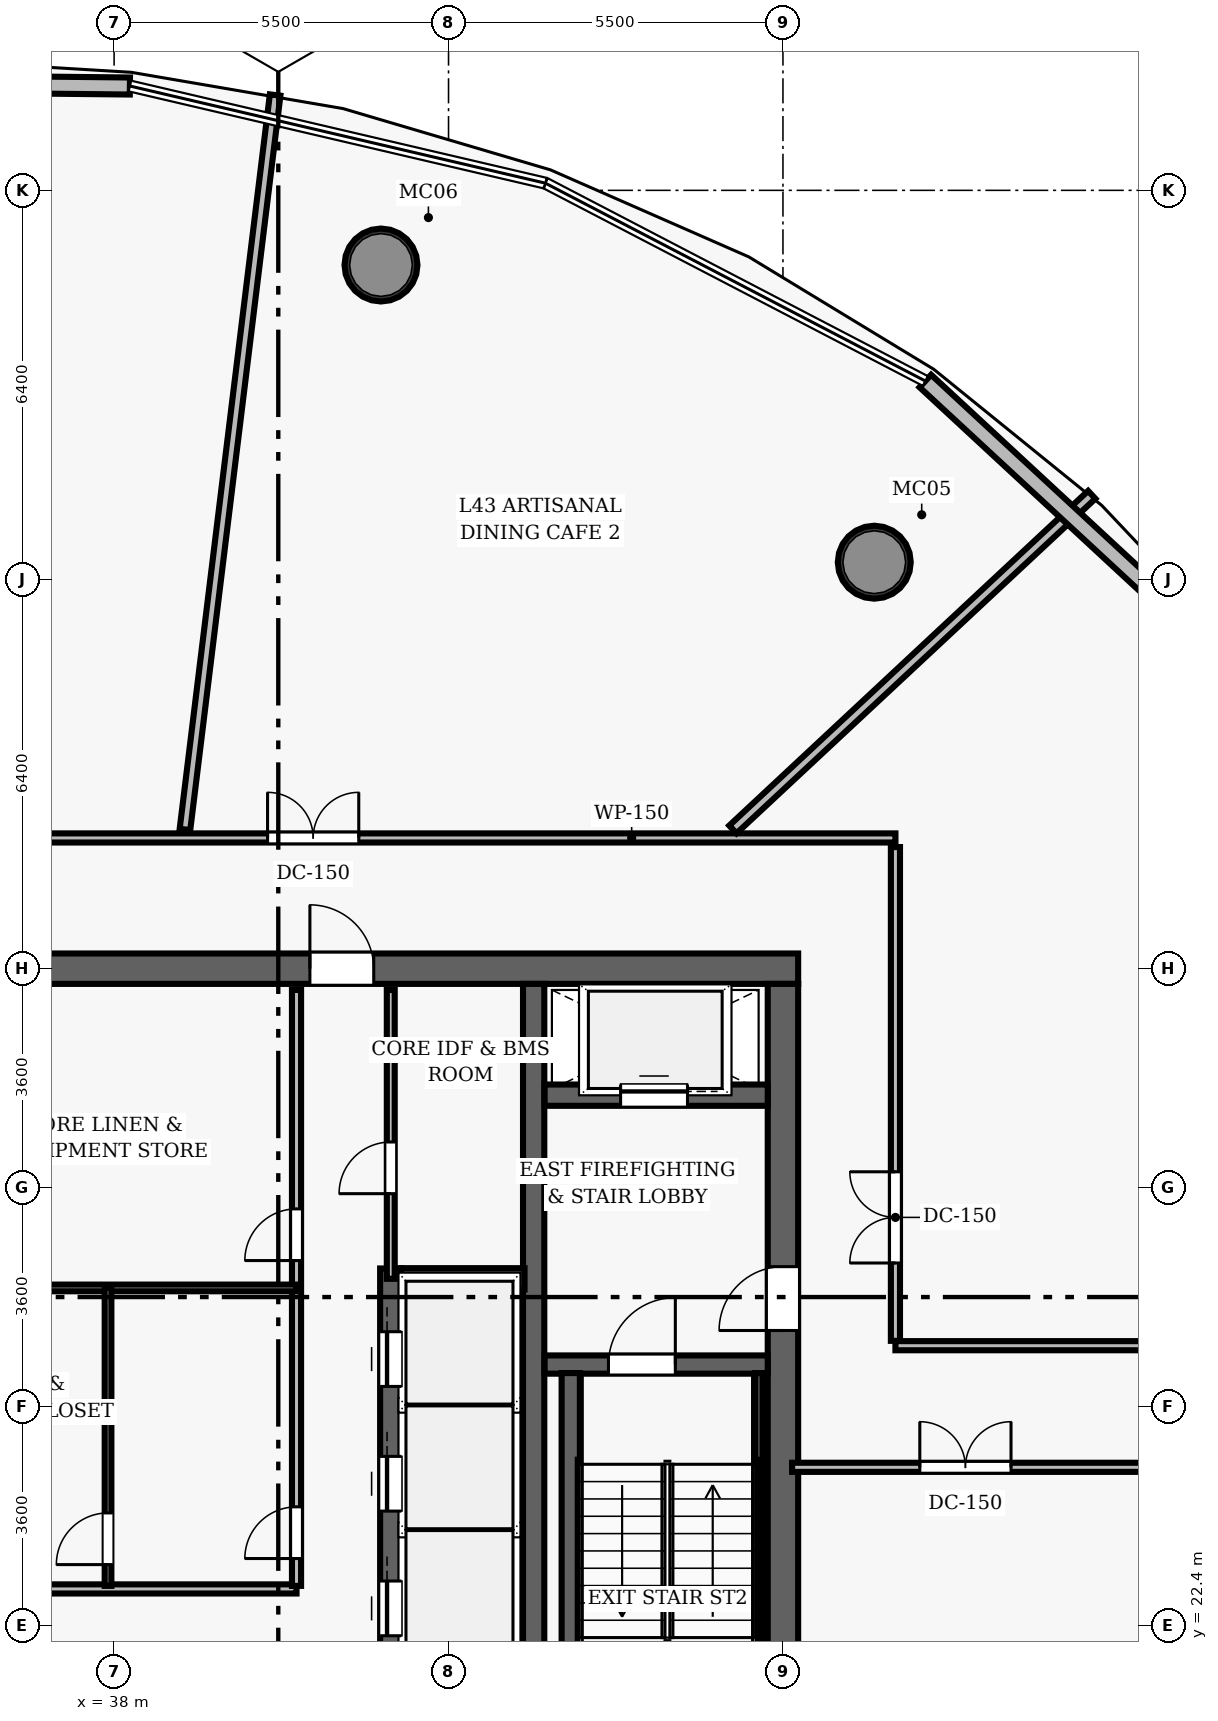
"""IFC4 building model, lengths in metres.
Left out: names, types, materials, properties, quantities, classifications, styles, units other than length and angle.
Written with IfcOpenShell. Run it as: python <this file> out.ifc"""

import sys

from ifc_helpers import new_model, si_unit, direction, frame, frame_2d, origin, origin_2d, place, context, subcontext, project, spatial, rectangle, hollow_circle, extrude, element, fill, save


model = new_model("IFC4")
c1 = context("Model", 3, precision=1e-05, world=origin(), true_north=direction((0.0, 1.0)))
c2 = subcontext(c1, "Body", "Model", "MODEL_VIEW")
j1 = project(units=[si_unit("LENGTHUNIT", "METRE"), si_unit("PLANEANGLEUNIT", "RADIAN")], contexts=[c1])
p1 = place(None, origin())
s1 = spatial("IfcSite", under=j1, at=p1, CompositionType="ELEMENT")
p2 = place(p1, origin())
s2 = spatial("IfcBuilding", under=s1, at=p2, CompositionType="ELEMENT")
p3 = place(p2, frame((0.0, 0.0, 171.2)))
s3 = spatial("IfcBuildingStorey", under=s2, at=p3, CompositionType="ELEMENT", Elevation=171.2)
p4 = place(p3, frame((26.75, 33.2, 0.0), z_axis=(0.0, 0.0, 1.0), x_axis=(1.0, 0.0, 0.0)))
e1 = element("IfcWall", 1, at=p4, inside=s3, PredefinedType="SHEAR", context=c2, shape_type="SweptSolid", body=[
    extrude(rectangle(XDim=22.5, YDim=0.5, at=frame_2d((11.25, 0.0))), origin(), (0.0, 0.0, 1.0), 3.85),
])
p5 = place(p4, frame((4.57, 0.0, 0.0)))
e2 = element("IfcOpeningElement", 2, at=p5, cuts=e1, PredefinedType="OPENING", context=c2, shape_type="SweptSolid", body=[
    extrude(rectangle(XDim=1.05, YDim=2.15, at=frame_2d((0.525, 1.075))), frame((0.0, 0.26, 0.0), z_axis=(0.0, -1.0, 0.0), x_axis=(1.0, 0.0, 0.0)), (0.0, 0.0, 1.0), 0.52),
])
p6 = place(p4, frame((14.47, 0.0, 0.0)))
e3 = element("IfcOpeningElement", 3, at=p6, cuts=e1, PredefinedType="OPENING", context=c2, shape_type="SweptSolid", body=[
    extrude(rectangle(XDim=1.05, YDim=2.15, at=frame_2d((0.525, 1.075))), frame((0.0, 0.26, 0.0), z_axis=(0.0, -1.0, 0.0), x_axis=(1.0, 0.0, 0.0)), (0.0, 0.0, 1.0), 0.52),
])
p7 = place(p3, frame((49.0, 19.05, 0.0), z_axis=(0.0, 0.0, 1.0), x_axis=(0.0, 1.0, 0.0)))
e4 = element("IfcWall", 4, at=p7, inside=s3, PredefinedType="SHEAR", context=c2, shape_type="SweptSolid", body=[
    extrude(rectangle(XDim=13.9, YDim=0.5, at=frame_2d((6.95, 0.0))), origin(), (0.0, 0.0, 1.0), 3.85),
])
p8 = place(p7, frame((8.2, 0.0, 0.0)))
e5 = element("IfcOpeningElement", 5, at=p8, cuts=e4, PredefinedType="OPENING", context=c2, shape_type="SweptSolid", body=[
    extrude(rectangle(XDim=1.05, YDim=2.15, at=frame_2d((0.525, 1.075))), frame((0.0, 0.26, 0.0), z_axis=(0.0, -1.0, 0.0), x_axis=(1.0, 0.0, 0.0)), (0.0, 0.0, 1.0), 0.52),
])
p9 = place(p3, frame((44.9, 19.05, 0.0), z_axis=(0.0, 0.0, 1.0), x_axis=(0.0, 1.0, 0.0)))
e6 = element("IfcWall", 6, at=p9, inside=s3, PredefinedType="SHEAR", context=c2, shape_type="SweptSolid", body=[
    extrude(rectangle(XDim=13.9, YDim=0.35, at=frame_2d((6.95, 0.0))), origin(), (0.0, 0.0, 1.0), 3.85),
])
for number, where, z_axis, x_axis in (
    (7, (50.502, 39.885, 0.0), (0.0, 0.0, 1.0), (1.0, 0.0, 0.0)),
    (8, (42.389, 44.772, 0.0), (0.0, 0.0, 1.0), (1.0, 0.0, 0.0)),
):
    element("IfcColumn", number, at=place(p3, frame(where, z_axis=z_axis, x_axis=x_axis)), inside=s3, PredefinedType="COLUMN", context=c2, shape_type="SweptSolid", body=[
        extrude(hollow_circle(Radius=0.6, WallThickness=0.05, at=origin_2d()), origin(), (0.0, 0.0, 1.0), 3.85),
    ])
p10 = place(p3, frame((45.08, 26.69, 0.0), z_axis=(0.0, 0.0, 1.0), x_axis=(1.0, 0.0, 0.0)))
e9 = element("IfcWall", 9, at=p10, inside=s3, PredefinedType="SHEAR", context=c2, shape_type="SweptSolid", body=[
    extrude(rectangle(XDim=3.67, YDim=0.3, at=frame_2d((1.835, 0.0))), origin(), (0.0, 0.0, 1.0), 3.85),
])
p11 = place(p10, frame((1.05, 0.0, 0.0)))
e10 = element("IfcOpeningElement", 10, at=p11, cuts=e9, PredefinedType="OPENING", context=c2, shape_type="SweptSolid", body=[
    extrude(rectangle(XDim=1.1, YDim=2.15, at=frame_2d((0.55, 1.075))), frame((0.0, 0.16, 0.0), z_axis=(0.0, -1.0, 0.0), x_axis=(1.0, 0.0, 0.0)), (0.0, 0.0, 1.0), 0.32),
])
p12 = place(p3, frame((45.51, 19.05, 0.0), z_axis=(0.0, 0.0, 1.0), x_axis=(0.0, 1.0, 0.0)))
e11 = element("IfcWall", 11, at=p12, inside=s3, PredefinedType="SHEAR", context=c2, shape_type="SweptSolid", body=[
    extrude(rectangle(XDim=7.5, YDim=0.3, at=frame_2d((3.75, 0.0))), origin(), (0.0, 0.0, 1.0), 3.85),
])
p13 = place(p3, frame((48.605, 19.1, 0.0), z_axis=(0.0, 0.0, 1.0), x_axis=(0.0, 1.0, 0.0)))
e12 = element("IfcWall", 12, at=p13, inside=s3, PredefinedType="SHEAR", context=c2, shape_type="SweptSolid", body=[
    extrude(rectangle(XDim=7.45, YDim=0.12, at=frame_2d((3.725, 0.0))), origin(), (0.0, 0.0, 1.0), 3.85),
])
p14 = place(p3, frame((45.08, 31.12, 0.0), z_axis=(0.0, 0.0, 1.0), x_axis=(1.0, 0.0, 0.0)))
e13 = element("IfcWall", 13, at=p14, inside=s3, PredefinedType="SHEAR", context=c2, shape_type="SweptSolid", body=[
    extrude(rectangle(XDim=3.67, YDim=0.35, at=frame_2d((1.835, 0.0))), origin(), (0.0, 0.0, 1.0), 3.035),
])
p15 = place(p14, frame((1.25, 0.0, 0.0)))
e14 = element("IfcOpeningElement", 14, at=p15, cuts=e13, PredefinedType="OPENING", context=c2, shape_type="SweptSolid", body=[
    extrude(rectangle(XDim=1.1, YDim=2.15, at=frame_2d((0.55, 1.075))), frame((0.0, 0.185, 0.0), z_axis=(0.0, -1.0, 0.0), x_axis=(1.0, 0.0, 0.0)), (0.0, 0.0, 1.0), 0.37),
])
p16 = place(p3, frame((42.55, 21.73, 0.0), z_axis=(0.0, 0.0, 1.0), x_axis=(0.0, 1.0, 0.0)))
e15 = element("IfcWall", 15, at=p16, inside=s3, PredefinedType="SHEAR", context=c2, shape_type="SweptSolid", body=[
    extrude(rectangle(XDim=6.54, YDim=0.35, at=frame_2d((3.27, 0.0))), origin(), (0.0, 0.0, 1.0), 3.035),
])
p17 = place(p16, frame((0.5, 0.0, 0.0)))
e16 = element("IfcOpeningElement", 16, at=p17, cuts=e15, PredefinedType="OPENING", context=c2, shape_type="SweptSolid", body=[
    extrude(rectangle(XDim=0.9, YDim=2.15, at=frame_2d((0.45, 1.075))), frame((0.0, 0.185, 0.0), z_axis=(0.0, -1.0, 0.0), x_axis=(1.0, 0.0, 0.0)), (0.0, 0.0, 1.0), 0.37),
])
p18 = place(p16, frame((2.55, 0.0, 0.0)))
e17 = element("IfcOpeningElement", 17, at=p18, cuts=e15, PredefinedType="OPENING", context=c2, shape_type="SweptSolid", body=[
    extrude(rectangle(XDim=0.9, YDim=2.15, at=frame_2d((0.45, 1.075))), frame((0.0, 0.185, 0.0), z_axis=(0.0, -1.0, 0.0), x_axis=(1.0, 0.0, 0.0)), (0.0, 0.0, 1.0), 0.37),
])
p19 = place(p16, frame((4.6, 0.0, 0.0)))
e18 = element("IfcOpeningElement", 18, at=p19, cuts=e15, PredefinedType="OPENING", context=c2, shape_type="SweptSolid", body=[
    extrude(rectangle(XDim=0.9, YDim=2.15, at=frame_2d((0.45, 1.075))), frame((0.0, 0.185, 0.0), z_axis=(0.0, -1.0, 0.0), x_axis=(1.0, 0.0, 0.0)), (0.0, 0.0, 1.0), 0.37),
])
p20 = place(p3, frame((42.72, 28.1, 0.0), z_axis=(0.0, 0.0, 1.0), x_axis=(1.0, 0.0, 0.0)))
e19 = element("IfcWall", 19, at=p20, inside=s3, PredefinedType="SHEAR", context=c2, shape_type="SweptSolid", body=[
    extrude(rectangle(XDim=2.03, YDim=0.35, at=frame_2d((1.015, 0.0))), origin(), (0.0, 0.0, 1.0), 3.035),
])
p21 = place(p3, frame((34.75, 23.0, 0.0), z_axis=(0.0, 0.0, 1.0), x_axis=(1.0, 0.0, 0.0)))
e20 = element("IfcWall", 20, at=p21, inside=s3, PredefinedType="PARTITIONING", context=c2, shape_type="SweptSolid", body=[
    extrude(rectangle(XDim=6.25, YDim=0.15, at=frame_2d((3.125, 0.0))), origin(), (0.0, 0.0, 1.0), 3.035),
])
p22 = place(p3, frame((41.0, 23.05, 0.0), z_axis=(0.0, 0.0, 1.0), x_axis=(0.0, 1.0, 0.0)))
e21 = element("IfcWall", 21, at=p22, inside=s3, PredefinedType="PARTITIONING", context=c2, shape_type="SweptSolid", body=[
    extrude(rectangle(XDim=9.8, YDim=0.15, at=frame_2d((4.9, 0.0))), origin(), (0.0, 0.0, 1.0), 3.035),
])
p23 = place(p22, frame((5.35, 0.0, 0.0)))
e22 = element("IfcOpeningElement", 22, at=p23, cuts=e21, PredefinedType="OPENING", context=c2, shape_type="SweptSolid", body=[
    extrude(rectangle(XDim=0.85, YDim=2.1, at=frame_2d((0.425, 1.05))), frame((0.0, 0.085, 0.0), z_axis=(0.0, -1.0, 0.0), x_axis=(1.0, 0.0, 0.0)), (0.0, 0.0, 1.0), 0.17),
])
p24 = place(p22, frame((0.45, 0.0, 0.0)))
e23 = element("IfcOpeningElement", 23, at=p24, cuts=e21, PredefinedType="OPENING", context=c2, shape_type="SweptSolid", body=[
    extrude(rectangle(XDim=0.85, YDim=2.1, at=frame_2d((0.425, 1.05))), frame((0.0, 0.085, 0.0), z_axis=(0.0, -1.0, 0.0), x_axis=(1.0, 0.0, 0.0)), (0.0, 0.0, 1.0), 0.17),
])
p25 = place(p3, frame((34.75, 27.95, 0.0), z_axis=(0.0, 0.0, 1.0), x_axis=(1.0, 0.0, 0.0)))
e24 = element("IfcWall", 24, at=p25, inside=s3, PredefinedType="PARTITIONING", context=c2, shape_type="SweptSolid", body=[
    extrude(rectangle(XDim=6.25, YDim=0.11, at=frame_2d((3.125, 0.0))), origin(), (0.0, 0.0, 1.0), 3.035),
])
p26 = place(p3, frame((37.9, 23.05, 0.0), z_axis=(0.0, 0.0, 1.0), x_axis=(0.0, 1.0, 0.0)))
e25 = element("IfcWall", 25, at=p26, inside=s3, PredefinedType="PARTITIONING", context=c2, shape_type="SweptSolid", body=[
    extrude(rectangle(XDim=4.9, YDim=0.11, at=frame_2d((2.45, 0.0))), origin(), (0.0, 0.0, 1.0), 3.035),
])
p27 = place(p26, frame((0.35, 0.0, 0.0)))
e26 = element("IfcOpeningElement", 26, at=p27, cuts=e25, PredefinedType="OPENING", context=c2, shape_type="SweptSolid", body=[
    extrude(rectangle(XDim=0.85, YDim=2.1, at=frame_2d((0.425, 1.05))), frame((0.0, 0.065, 0.0), z_axis=(0.0, -1.0, 0.0), x_axis=(1.0, 0.0, 0.0)), (0.0, 0.0, 1.0), 0.13),
])
p28 = place(p3, frame((42.55, 28.1, 0.0), z_axis=(0.0, 0.0, 1.0), x_axis=(0.0, 1.0, 0.0)))
e27 = element("IfcWall", 27, at=p28, inside=s3, PredefinedType="PARTITIONING", context=c2, shape_type="SweptSolid", body=[
    extrude(rectangle(XDim=4.75, YDim=0.13, at=frame_2d((2.375, 0.0))), origin(), (0.0, 0.0, 1.0), 3.035),
])
p29 = place(p28, frame((1.4, 0.0, 0.0)))
e28 = element("IfcOpeningElement", 28, at=p29, cuts=e27, PredefinedType="OPENING", context=c2, shape_type="SweptSolid", body=[
    extrude(rectangle(XDim=0.85, YDim=2.1, at=frame_2d((0.425, 1.05))), frame((0.0, 0.075, 0.0), z_axis=(0.0, -1.0, 0.0), x_axis=(1.0, 0.0, 0.0)), (0.0, 0.0, 1.0), 0.15),
])
p30 = place(p3, frame((24.85, 35.35, 0.0), z_axis=(0.0, 0.0, 1.0), x_axis=(1.0, 0.0, 0.0)))
e29 = element("IfcWall", 29, at=p30, inside=s3, PredefinedType="PARTITIONING", context=c2, shape_type="SweptSolid", body=[
    extrude(rectangle(XDim=26.0, YDim=0.15, at=frame_2d((13.0, 0.0))), origin(), (0.0, 0.0, 1.0), 3.035),
])
p31 = place(p30, frame((15.674, 0.0, 0.0)))
e30 = element("IfcOpeningElement", 30, at=p31, cuts=e29, PredefinedType="OPENING", context=c2, shape_type="SweptSolid", body=[
    extrude(rectangle(XDim=1.5, YDim=2.2, at=frame_2d((0.75, 1.1))), frame((0.0, 0.085, 0.0), z_axis=(0.0, -1.0, 0.0), x_axis=(1.0, 0.0, 0.0)), (0.0, 0.0, 1.0), 0.17),
])
p32 = place(p30, frame((10.178, 0.0, 0.0)))
e31 = element("IfcOpeningElement", 31, at=p32, cuts=e29, PredefinedType="OPENING", context=c2, shape_type="SweptSolid", body=[
    extrude(rectangle(XDim=0.95, YDim=2.15, at=frame_2d((0.475, 1.075))), frame((0.0, 0.085, 0.0), z_axis=(0.0, -1.0, 0.0), x_axis=(1.0, 0.0, 0.0)), (0.0, 0.0, 1.0), 0.17),
])
p33 = place(p30, frame((4.997, 0.0, 0.0)))
e32 = element("IfcOpeningElement", 32, at=p33, cuts=e29, PredefinedType="OPENING", context=c2, shape_type="SweptSolid", body=[
    extrude(rectangle(XDim=0.95, YDim=2.15, at=frame_2d((0.475, 1.075))), frame((0.0, 0.085, 0.0), z_axis=(0.0, -1.0, 0.0), x_axis=(1.0, 0.0, 0.0)), (0.0, 0.0, 1.0), 0.17),
])
p34 = place(p3, frame((50.85, 27.08, 0.0), z_axis=(0.0, 0.0, 1.0), x_axis=(0.0, 1.0, 0.0)))
e33 = element("IfcWall", 33, at=p34, inside=s3, PredefinedType="PARTITIONING", context=c2, shape_type="SweptSolid", body=[
    extrude(rectangle(XDim=8.12, YDim=0.15, at=frame_2d((4.06, 0.0))), origin(), (0.0, 0.0, 1.0), 3.035),
])
p35 = place(p34, frame((1.28, 0.0, 0.0)))
e34 = element("IfcOpeningElement", 34, at=p35, cuts=e33, PredefinedType="OPENING", context=c2, shape_type="SweptSolid", body=[
    extrude(rectangle(XDim=1.5, YDim=2.2, at=frame_2d((0.75, 1.1))), frame((0.0, 0.085, 0.0), z_axis=(0.0, -1.0, 0.0), x_axis=(1.0, 0.0, 0.0)), (0.0, 0.0, 1.0), 0.17),
])
p36 = place(p3, frame((50.85, 27.0, 0.0), z_axis=(0.0, 0.0, 1.0), x_axis=(1.0, 0.0, 0.0)))
e35 = element("IfcWall", 35, at=p36, inside=s3, PredefinedType="PARTITIONING", context=c2, shape_type="SweptSolid", body=[
    extrude(rectangle(XDim=9.703, YDim=0.15, at=frame_2d((4.852, 0.0))), origin(), (0.0, 0.0, 1.0), 3.035),
])
p37 = place(p3, frame((49.15, 25.0, 0.0), z_axis=(0.0, 0.0, 1.0), x_axis=(1.0, 0.0, 0.0)))
e36 = element("IfcWall", 36, at=p37, inside=s3, PredefinedType="PARTITIONING", context=c2, shape_type="SweptSolid", body=[
    extrude(rectangle(XDim=11.403, YDim=0.15, at=frame_2d((5.702, 0.0))), origin(), (0.0, 0.0, 1.0), 3.035),
])
p38 = place(p37, frame((2.101, 0.0, 0.0)))
e37 = element("IfcOpeningElement", 37, at=p38, cuts=e36, PredefinedType="OPENING", context=c2, shape_type="SweptSolid", body=[
    extrude(rectangle(XDim=1.5, YDim=2.2, at=frame_2d((0.75, 1.1))), frame((0.0, 0.085, 0.0), z_axis=(0.0, -1.0, 0.0), x_axis=(1.0, 0.0, 0.0)), (0.0, 0.0, 1.0), 0.17),
])
p39 = place(p3, frame((48.177, 35.49, 0.0), z_axis=(0.0, 0.0, 1.0), x_axis=(0.731363052837, 0.681988331971, 0.0)))
e38 = element("IfcWall", 38, at=p39, inside=s3, PredefinedType="PARTITIONING", context=c2, shape_type="SweptSolid", body=[
    extrude(rectangle(XDim=8.07, YDim=0.175, at=frame_2d((4.035, 0.0))), origin(), (0.0, 0.0, 1.0), 3.035),
])
p40 = place(p3, frame((39.165, 35.49, 0.0), z_axis=(0.0, 0.0, 1.0), x_axis=(0.121866334527, 0.99254652108, 0.0)))
e39 = element("IfcWall", 39, at=p40, inside=s3, PredefinedType="PARTITIONING", context=c2, shape_type="SweptSolid", body=[
    extrude(rectangle(XDim=12.168, YDim=0.175, at=frame_2d((6.084, 0.0))), origin(), (0.0, 0.0, 1.0), 3.035),
])
p41 = place(p3, frame((51.342, 42.865, 0.0), z_axis=(0.0, 0.0, 1.0), x_axis=(0.733767711646, -0.679400430782, 0.0)))
e40 = element("IfcWall", 40, at=p41, inside=s3, PredefinedType="SOLIDWALL", context=c2, shape_type="SweptSolid", body=[
    extrude(rectangle(XDim=7.046, YDim=0.28, at=frame_2d((3.523, 0.0))), origin(), (0.0, 0.0, 1.0), 3.62),
])
p42 = place(p3, frame((31.475, 47.787, 0.0), z_axis=(0.0, 0.0, 1.0), x_axis=(0.999945547735, -0.010435591221, 0.0)))
e41 = element("IfcWall", 41, at=p42, inside=s3, PredefinedType="SOLIDWALL", context=c2, shape_type="SweptSolid", body=[
    extrude(rectangle(XDim=6.785, YDim=0.28, at=frame_2d((3.392, 0.0))), origin(), (0.0, 0.0, 1.0), 3.62),
])
p43 = place(p11, origin())
e42 = element("IfcDoor", 42, at=p43, inside=s3, OperationType="SINGLE_SWING_RIGHT", PredefinedType="DOOR", context=c2, shape_type="SweptSolid", body=[
    extrude(rectangle(XDim=1.1, YDim=2.15, at=frame_2d((0.55, 1.075))), frame((0.0, 0.025, 0.0), z_axis=(0.0, -1.0, 0.0), x_axis=(1.0, 0.0, 0.0)), (0.0, 0.0, 1.0), 0.05),
])
fill(e10, e42)
p44 = place(p8, origin())
e43 = element("IfcDoor", 43, at=p44, inside=s3, OperationType="SINGLE_SWING_LEFT", PredefinedType="DOOR", context=c2, shape_type="SweptSolid", body=[
    extrude(rectangle(XDim=1.05, YDim=2.15, at=frame_2d((0.525, 1.075))), frame((0.0, 0.025, 0.0), z_axis=(0.0, -1.0, 0.0), x_axis=(1.0, 0.0, 0.0)), (0.0, 0.0, 1.0), 0.05),
])
fill(e5, e43)
p45 = place(p6, origin())
e44 = element("IfcDoor", 44, at=p45, inside=s3, OperationType="SINGLE_SWING_LEFT", PredefinedType="DOOR", context=c2, shape_type="SweptSolid", body=[
    extrude(rectangle(XDim=1.05, YDim=2.15, at=frame_2d((0.525, 1.075))), frame((0.0, 0.025, 0.0), z_axis=(0.0, -1.0, 0.0), x_axis=(1.0, 0.0, 0.0)), (0.0, 0.0, 1.0), 0.05),
])
fill(e3, e44)
p46 = place(p23, origin())
e45 = element("IfcDoor", 45, at=p46, inside=s3, OperationType="SINGLE_SWING_LEFT", PredefinedType="DOOR", context=c2, shape_type="SweptSolid", body=[
    extrude(rectangle(XDim=0.85, YDim=2.1, at=frame_2d((0.425, 1.05))), frame((0.0, 0.025, 0.0), z_axis=(0.0, -1.0, 0.0), x_axis=(1.0, 0.0, 0.0)), (0.0, 0.0, 1.0), 0.05),
])
fill(e22, e45)
p47 = place(p24, origin())
e46 = element("IfcDoor", 46, at=p47, inside=s3, OperationType="SINGLE_SWING_LEFT", PredefinedType="DOOR", context=c2, shape_type="SweptSolid", body=[
    extrude(rectangle(XDim=0.85, YDim=2.1, at=frame_2d((0.425, 1.05))), frame((0.0, 0.025, 0.0), z_axis=(0.0, -1.0, 0.0), x_axis=(1.0, 0.0, 0.0)), (0.0, 0.0, 1.0), 0.05),
])
fill(e23, e46)
p48 = place(p27, origin())
e47 = element("IfcDoor", 47, at=p48, inside=s3, OperationType="SINGLE_SWING_LEFT", PredefinedType="DOOR", context=c2, shape_type="SweptSolid", body=[
    extrude(rectangle(XDim=0.85, YDim=2.1, at=frame_2d((0.425, 1.05))), frame((0.0, 0.025, 0.0), z_axis=(0.0, -1.0, 0.0), x_axis=(1.0, 0.0, 0.0)), (0.0, 0.0, 1.0), 0.05),
])
fill(e26, e47)
p49 = place(p29, origin())
e48 = element("IfcDoor", 48, at=p49, inside=s3, OperationType="SINGLE_SWING_LEFT", PredefinedType="DOOR", context=c2, shape_type="SweptSolid", body=[
    extrude(rectangle(XDim=0.85, YDim=2.1, at=frame_2d((0.425, 1.05))), frame((0.0, 0.025, 0.0), z_axis=(0.0, -1.0, 0.0), x_axis=(1.0, 0.0, 0.0)), (0.0, 0.0, 1.0), 0.05),
])
fill(e28, e48)
p50 = place(p35, origin())
e49 = element("IfcDoor", 49, at=p50, inside=s3, OperationType="DOUBLE_DOOR_SINGLE_SWING", PredefinedType="DOOR", context=c2, shape_type="SweptSolid", body=[
    extrude(rectangle(XDim=1.5, YDim=2.2, at=frame_2d((0.75, 1.1))), frame((0.0, 0.025, 0.0), z_axis=(0.0, -1.0, 0.0), x_axis=(1.0, 0.0, 0.0)), (0.0, 0.0, 1.0), 0.05),
])
fill(e34, e49)
p51 = place(p31, origin())
e50 = element("IfcDoor", 50, at=p51, inside=s3, OperationType="DOUBLE_DOOR_SINGLE_SWING", PredefinedType="DOOR", context=c2, shape_type="SweptSolid", body=[
    extrude(rectangle(XDim=1.5, YDim=2.2, at=frame_2d((0.75, 1.1))), frame((0.0, 0.025, 0.0), z_axis=(0.0, -1.0, 0.0), x_axis=(1.0, 0.0, 0.0)), (0.0, 0.0, 1.0), 0.05),
])
fill(e30, e50)
p52 = place(p38, origin())
e51 = element("IfcDoor", 51, at=p52, inside=s3, OperationType="DOUBLE_DOOR_SINGLE_SWING", PredefinedType="DOOR", context=c2, shape_type="SweptSolid", body=[
    extrude(rectangle(XDim=1.5, YDim=2.2, at=frame_2d((0.75, 1.1))), frame((0.0, 0.025, 0.0), z_axis=(0.0, -1.0, 0.0), x_axis=(1.0, 0.0, 0.0)), (0.0, 0.0, 1.0), 0.05),
])
fill(e37, e51)
p53 = place(p17, origin())
e52 = element("IfcDoor", 52, at=p53, inside=s3, OperationType="SLIDING_TO_LEFT", PredefinedType="DOOR", context=c2, shape_type="SweptSolid", body=[
    extrude(rectangle(XDim=0.9, YDim=2.15, at=frame_2d((0.45, 1.075))), frame((0.0, 0.025, 0.0), z_axis=(0.0, -1.0, 0.0), x_axis=(1.0, 0.0, 0.0)), (0.0, 0.0, 1.0), 0.05),
])
fill(e16, e52)
p54 = place(p18, origin())
e53 = element("IfcDoor", 53, at=p54, inside=s3, OperationType="SLIDING_TO_LEFT", PredefinedType="DOOR", context=c2, shape_type="SweptSolid", body=[
    extrude(rectangle(XDim=0.9, YDim=2.15, at=frame_2d((0.45, 1.075))), frame((0.0, 0.025, 0.0), z_axis=(0.0, -1.0, 0.0), x_axis=(1.0, 0.0, 0.0)), (0.0, 0.0, 1.0), 0.05),
])
fill(e17, e53)
p55 = place(p19, origin())
e54 = element("IfcDoor", 54, at=p55, inside=s3, OperationType="SLIDING_TO_LEFT", PredefinedType="DOOR", context=c2, shape_type="SweptSolid", body=[
    extrude(rectangle(XDim=0.9, YDim=2.15, at=frame_2d((0.45, 1.075))), frame((0.0, 0.025, 0.0), z_axis=(0.0, -1.0, 0.0), x_axis=(1.0, 0.0, 0.0)), (0.0, 0.0, 1.0), 0.05),
])
fill(e18, e54)
p56 = place(p15, origin())
e55 = element("IfcDoor", 55, at=p56, inside=s3, OperationType="SLIDING_TO_LEFT", PredefinedType="DOOR", context=c2, shape_type="SweptSolid", body=[
    extrude(rectangle(XDim=1.1, YDim=2.15, at=frame_2d((0.55, 1.075))), frame((0.0, 0.025, 0.0), z_axis=(0.0, -1.0, 0.0), x_axis=(1.0, 0.0, 0.0)), (0.0, 0.0, 1.0), 0.05),
])
fill(e14, e55)
save(model, sys.argv[1])
